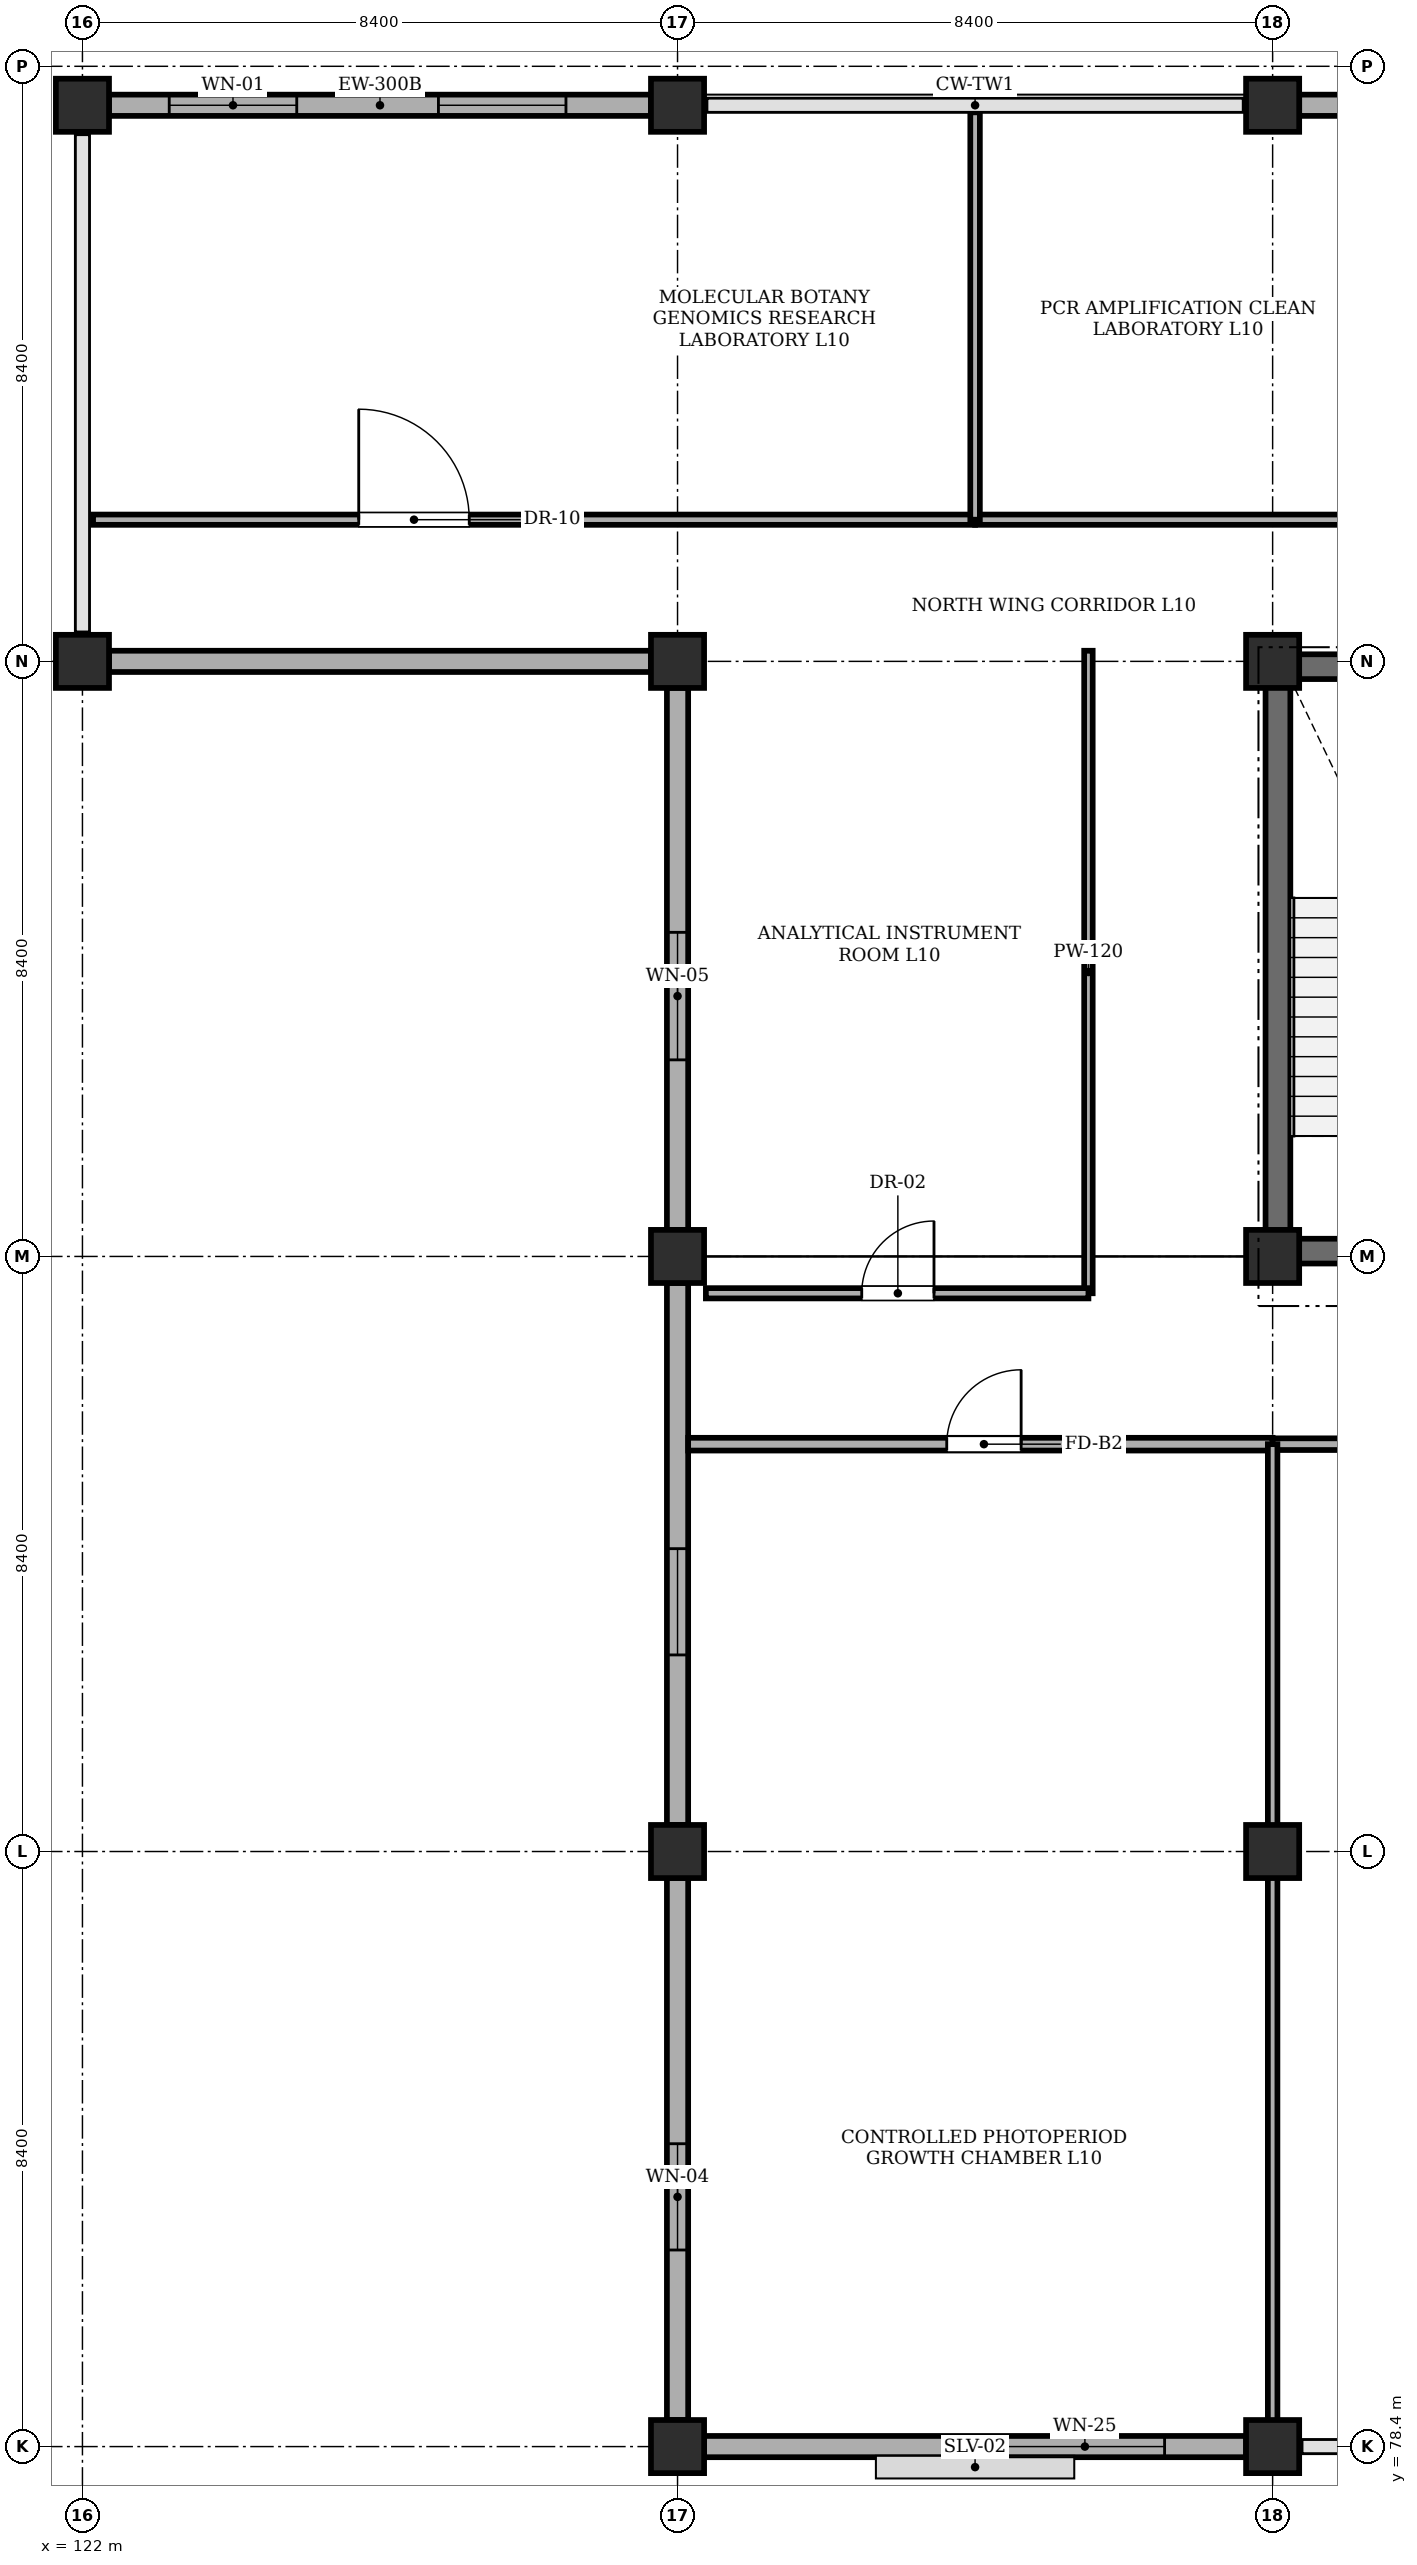
"""IFC4 building model, lengths in metres.
Left out: names, types, materials, properties, quantities, classifications, styles, units other than length and angle.
Written with IfcOpenShell. Run it as: python <this file> out.ifc"""

import sys

from ifc_helpers import new_model, si_unit, direction, frame, frame_2d, origin, origin_2d, place, context, subcontext, project, spatial, rectangle, extrude, element, fill, save


model = new_model("IFC4")
c1 = context("Model", 3, precision=1e-05, world=origin(), true_north=direction((0.0, 1.0)))
c2 = subcontext(c1, "Body", "Model", "MODEL_VIEW")
j1 = project(units=[si_unit("LENGTHUNIT", "METRE"), si_unit("PLANEANGLEUNIT", "RADIAN")], contexts=[c1])
p1 = place(None, origin())
s1 = spatial("IfcSite", under=j1, at=p1, CompositionType="ELEMENT")
p2 = place(p1, origin())
s2 = spatial("IfcBuilding", under=s1, at=p2, CompositionType="ELEMENT")
p3 = place(p2, frame((0.0, 0.0, 40.2)))
s3 = spatial("IfcBuildingStorey", under=s2, at=p3, CompositionType="ELEMENT", Elevation=40.2)
for number, where, z_axis, x_axis in (
    (1, (122.0, 103.6, 0.0), (0.0, 0.0, 1.0), (1.0, 0.0, 0.0)),
    (2, (122.0, 111.45, 0.0), (0.0, 0.0, 1.0), (1.0, 0.0, 0.0)),
    (3, (130.4, 78.4, 0.0), (0.0, 0.0, 1.0), (1.0, 0.0, 0.0)),
    (4, (130.4, 86.8, 0.0), (0.0, 0.0, 1.0), (1.0, 0.0, 0.0)),
    (5, (130.4, 95.2, 0.0), (0.0, 0.0, 1.0), (1.0, 0.0, 0.0)),
    (6, (130.4, 103.6, 0.0), (0.0, 0.0, 1.0), (1.0, 0.0, 0.0)),
    (7, (130.4, 111.45, 0.0), (0.0, 0.0, 1.0), (1.0, 0.0, 0.0)),
    (8, (138.8, 78.4, 0.0), (0.0, 0.0, 1.0), (1.0, 0.0, 0.0)),
    (9, (138.8, 86.8, 0.0), (0.0, 0.0, 1.0), (1.0, 0.0, 0.0)),
    (10, (138.8, 95.2, 0.0), (0.0, 0.0, 1.0), (1.0, 0.0, 0.0)),
    (11, (138.8, 103.6, 0.0), (0.0, 0.0, 1.0), (1.0, 0.0, 0.0)),
    (12, (138.8, 111.45, 0.0), (0.0, 0.0, 1.0), (1.0, 0.0, 0.0)),
):
    element("IfcColumn", number, at=place(p3, frame(where, z_axis=z_axis, x_axis=x_axis)), inside=s3, PredefinedType="COLUMN", context=c2, shape_type="SweptSolid", body=[
        extrude(rectangle(XDim=0.75, YDim=0.75, at=origin_2d()), origin(), (0.0, 0.0, 1.0), 4.0),
    ])
for number, where, z_axis, x_axis in (
    (13, (138.7, 95.275, 0.0), (0.0, 0.0, 1.0), (1.0, 0.0, 0.0)),
    (14, (138.7, 103.525, 0.0), (0.0, 0.0, 1.0), (1.0, 0.0, 0.0)),
):
    element("IfcWall", number, at=place(p3, frame(where, z_axis=z_axis, x_axis=x_axis)), inside=s3, PredefinedType="SHEAR", context=c2, shape_type="SweptSolid", body=[
        extrude(rectangle(XDim=3.8, YDim=0.35, at=frame_2d((1.9, 0.0))), origin(), (0.0, 0.0, 1.0), 4.0),
    ])
p4 = place(p3, frame((138.875, 95.45, 0.0), z_axis=(0.0, 0.0, 1.0), x_axis=(0.0, 1.0, 0.0)))
e15 = element("IfcWall", 15, at=p4, inside=s3, PredefinedType="SHEAR", context=c2, shape_type="SweptSolid", body=[
    extrude(rectangle(XDim=7.9, YDim=0.35, at=frame_2d((3.95, 0.0))), origin(), (0.0, 0.0, 1.0), 4.0),
])
p5 = place(p3, frame((122.375, 111.45, 0.0), z_axis=(0.0, 0.0, 1.0), x_axis=(1.0, 0.0, 0.0)))
e16 = element("IfcWall", 16, at=p5, inside=s3, PredefinedType="STANDARD", context=c2, shape_type="SweptSolid", body=[
    extrude(rectangle(XDim=7.65, YDim=0.3, at=frame_2d((3.825, 0.0))), origin(), (0.0, 0.0, 1.0), 3.3),
])
p6 = place(p5, frame((0.85, 0.0, 0.9)))
e17 = element("IfcOpeningElement", 17, at=p6, cuts=e16, PredefinedType="OPENING", context=c2, shape_type="SweptSolid", body=[
    extrude(rectangle(XDim=1.8, YDim=2.1, at=frame_2d((0.9, 1.05))), frame((0.0, 0.16, 0.0), z_axis=(0.0, -1.0, 0.0), x_axis=(1.0, 0.0, 0.0)), (0.0, 0.0, 1.0), 0.32),
])
p7 = place(p5, frame((4.65, 0.0, 0.9)))
e18 = element("IfcOpeningElement", 18, at=p7, cuts=e16, PredefinedType="OPENING", context=c2, shape_type="SweptSolid", body=[
    extrude(rectangle(XDim=1.8, YDim=2.1, at=frame_2d((0.9, 1.05))), frame((0.0, 0.16, 0.0), z_axis=(0.0, -1.0, 0.0), x_axis=(1.0, 0.0, 0.0)), (0.0, 0.0, 1.0), 0.32),
])
p8 = place(p3, frame((139.175, 111.45, 0.0), z_axis=(0.0, 0.0, 1.0), x_axis=(1.0, 0.0, 0.0)))
e19 = element("IfcWall", 19, at=p8, inside=s3, PredefinedType="STANDARD", context=c2, shape_type="SweptSolid", body=[
    extrude(rectangle(XDim=7.65, YDim=0.3, at=frame_2d((3.825, 0.0))), origin(), (0.0, 0.0, 1.0), 3.3),
])
p9 = place(p8, frame((0.85, 0.0, 0.9)))
e20 = element("IfcOpeningElement", 20, at=p9, cuts=e19, PredefinedType="OPENING", context=c2, shape_type="SweptSolid", body=[
    extrude(rectangle(XDim=1.8, YDim=2.1, at=frame_2d((0.9, 1.05))), frame((0.0, 0.16, 0.0), z_axis=(0.0, -1.0, 0.0), x_axis=(1.0, 0.0, 0.0)), (0.0, 0.0, 1.0), 0.32),
])
p10 = place(p8, frame((4.65, 0.0, 0.9)))
e21 = element("IfcOpeningElement", 21, at=p10, cuts=e19, PredefinedType="OPENING", context=c2, shape_type="SweptSolid", body=[
    extrude(rectangle(XDim=1.8, YDim=2.1, at=frame_2d((0.9, 1.05))), frame((0.0, 0.16, 0.0), z_axis=(0.0, -1.0, 0.0), x_axis=(1.0, 0.0, 0.0)), (0.0, 0.0, 1.0), 0.32),
])
p11 = place(p3, frame((138.425, 78.4, 0.0), z_axis=(0.0, 0.0, 1.0), x_axis=(-1.0, 0.0, 0.0)))
e22 = element("IfcWall", 22, at=p11, inside=s3, PredefinedType="STANDARD", context=c2, shape_type="SweptSolid", body=[
    extrude(rectangle(XDim=7.65, YDim=0.3, at=frame_2d((3.825, 0.0))), origin(), (0.0, 0.0, 1.0), 4.0),
])
p12 = place(p11, frame((1.15, 0.0, 0.95)))
e23 = element("IfcOpeningElement", 23, at=p12, cuts=e22, PredefinedType="OPENING", context=c2, shape_type="SweptSolid", body=[
    extrude(rectangle(XDim=2.25, YDim=1.95, at=frame_2d((1.125, 0.975))), frame((0.0, 0.16, 0.0), z_axis=(0.0, -1.0, 0.0), x_axis=(1.0, 0.0, 0.0)), (0.0, 0.0, 1.0), 0.32),
])
p13 = place(p3, frame((130.4, 78.775, 0.0), z_axis=(0.0, 0.0, 1.0), x_axis=(0.0, 1.0, 0.0)))
e24 = element("IfcWall", 24, at=p13, inside=s3, PredefinedType="STANDARD", context=c2, shape_type="SweptSolid", body=[
    extrude(rectangle(XDim=7.65, YDim=0.3, at=frame_2d((3.825, 0.0))), origin(), (0.0, 0.0, 1.0), 4.0),
])
p14 = place(p13, frame((2.4, 0.0, 0.95)))
e25 = element("IfcOpeningElement", 25, at=p14, cuts=e24, PredefinedType="OPENING", context=c2, shape_type="SweptSolid", body=[
    extrude(rectangle(XDim=1.5, YDim=1.8, at=frame_2d((0.75, 0.9))), frame((0.0, 0.16, 0.0), z_axis=(0.0, -1.0, 0.0), x_axis=(1.0, 0.0, 0.0)), (0.0, 0.0, 1.0), 0.32),
])
p15 = place(p3, frame((130.4, 87.175, 0.0), z_axis=(0.0, 0.0, 1.0), x_axis=(0.0, 1.0, 0.0)))
e26 = element("IfcWall", 26, at=p15, inside=s3, PredefinedType="STANDARD", context=c2, shape_type="SweptSolid", body=[
    extrude(rectangle(XDim=7.65, YDim=0.3, at=frame_2d((3.825, 0.0))), origin(), (0.0, 0.0, 1.0), 3.3),
])
p16 = place(p15, frame((2.4, 0.0, 0.95)))
e27 = element("IfcOpeningElement", 27, at=p16, cuts=e26, PredefinedType="OPENING", context=c2, shape_type="SweptSolid", body=[
    extrude(rectangle(XDim=1.5, YDim=1.8, at=frame_2d((0.75, 0.9))), frame((0.0, 0.16, 0.0), z_axis=(0.0, -1.0, 0.0), x_axis=(1.0, 0.0, 0.0)), (0.0, 0.0, 1.0), 0.32),
])
p17 = place(p3, frame((130.4, 95.575, 0.0), z_axis=(0.0, 0.0, 1.0), x_axis=(0.0, 1.0, 0.0)))
e28 = element("IfcWall", 28, at=p17, inside=s3, PredefinedType="STANDARD", context=c2, shape_type="SweptSolid", body=[
    extrude(rectangle(XDim=7.65, YDim=0.3, at=frame_2d((3.825, 0.0))), origin(), (0.0, 0.0, 1.0), 3.3),
])
p18 = place(p17, frame((2.4, 0.0, 1.0)))
e29 = element("IfcOpeningElement", 29, at=p18, cuts=e28, PredefinedType="OPENING", context=c2, shape_type="SweptSolid", body=[
    extrude(rectangle(XDim=1.8, YDim=1.8, at=frame_2d((0.9, 0.9))), frame((0.0, 0.16, 0.0), z_axis=(0.0, -1.0, 0.0), x_axis=(1.0, 0.0, 0.0)), (0.0, 0.0, 1.0), 0.32),
])
p19 = place(p3, frame((130.025, 103.6, 0.0), z_axis=(0.0, 0.0, 1.0), x_axis=(-1.0, 0.0, 0.0)))
e30 = element("IfcWall", 30, at=p19, inside=s3, PredefinedType="STANDARD", context=c2, shape_type="SweptSolid", body=[
    extrude(rectangle(XDim=7.65, YDim=0.3, at=frame_2d((3.825, 0.0))), origin(), (0.0, 0.0, 1.0), 3.3),
])
p20 = place(p3, frame((136.2, 94.68, 0.0), z_axis=(0.0, 0.0, 1.0), x_axis=(0.0, 1.0, 0.0)))
e31 = element("IfcWall", 31, at=p20, inside=s3, PredefinedType="PARTITIONING", context=c2, shape_type="SweptSolid", body=[
    extrude(rectangle(XDim=9.07, YDim=0.12, at=frame_2d((4.535, 0.0))), origin(), (0.0, 0.0, 1.0), 4.0),
])
p21 = place(p3, frame((130.8, 94.68, 0.0), z_axis=(0.0, 0.0, 1.0), x_axis=(1.0, 0.0, 0.0)))
e32 = element("IfcWall", 32, at=p21, inside=s3, PredefinedType="PARTITIONING", context=c2, shape_type="SweptSolid", body=[
    extrude(rectangle(XDim=5.4, YDim=0.145, at=frame_2d((2.7, 0.0))), origin(), (0.0, 0.0, 1.0), 4.0),
])
p22 = place(p21, frame((2.2, 0.0, 0.0)))
e33 = element("IfcOpeningElement", 33, at=p22, cuts=e32, PredefinedType="OPENING", context=c2, shape_type="SweptSolid", body=[
    extrude(rectangle(XDim=1.02, YDim=2.15, at=frame_2d((0.51, 1.075))), frame((0.0, 0.083, 0.0), z_axis=(0.0, -1.0, 0.0), x_axis=(1.0, 0.0, 0.0)), (0.0, 0.0, 1.0), 0.165),
])
p23 = place(p3, frame((122.15, 105.6, 0.0), z_axis=(0.0, 0.0, 1.0), x_axis=(1.0, 0.0, 0.0)))
e34 = element("IfcWall", 34, at=p23, inside=s3, PredefinedType="PARTITIONING", context=c2, shape_type="SweptSolid", body=[
    extrude(rectangle(XDim=12.45, YDim=0.145, at=frame_2d((6.225, 0.0))), origin(), (0.0, 0.0, 1.0), 4.0),
])
p24 = place(p23, frame((3.75, 0.0, 0.0)))
e35 = element("IfcOpeningElement", 35, at=p24, cuts=e34, PredefinedType="OPENING", context=c2, shape_type="SweptSolid", body=[
    extrude(rectangle(XDim=1.56, YDim=2.22, at=frame_2d((0.78, 1.11))), frame((0.0, 0.083, 0.0), z_axis=(0.0, -1.0, 0.0), x_axis=(1.0, 0.0, 0.0)), (0.0, 0.0, 1.0), 0.165),
])
p25 = place(p3, frame((134.6, 105.6, 0.0), z_axis=(0.0, 0.0, 1.0), x_axis=(1.0, 0.0, 0.0)))
e36 = element("IfcWall", 36, at=p25, inside=s3, PredefinedType="PARTITIONING", context=c2, shape_type="SweptSolid", body=[
    extrude(rectangle(XDim=12.6, YDim=0.145, at=frame_2d((6.3, 0.0))), origin(), (0.0, 0.0, 1.0), 4.0),
])
p26 = place(p25, frame((6.8, 0.0, 0.0)))
e37 = element("IfcOpeningElement", 37, at=p26, cuts=e36, PredefinedType="OPENING", context=c2, shape_type="SweptSolid", body=[
    extrude(rectangle(XDim=1.02, YDim=2.15, at=frame_2d((0.51, 1.075))), frame((0.0, 0.083, 0.0), z_axis=(0.0, -1.0, 0.0), x_axis=(1.0, 0.0, 0.0)), (0.0, 0.0, 1.0), 0.165),
])
p27 = place(p3, frame((134.6, 105.6, 0.0), z_axis=(0.0, 0.0, 1.0), x_axis=(0.0, 1.0, 0.0)))
e38 = element("IfcWall", 38, at=p27, inside=s3, PredefinedType="PARTITIONING", context=c2, shape_type="SweptSolid", body=[
    extrude(rectangle(XDim=5.75, YDim=0.135, at=frame_2d((2.875, 0.0))), origin(), (0.0, 0.0, 1.0), 3.55),
])
p28 = place(p3, frame((130.55, 92.55, 0.0), z_axis=(0.0, 0.0, 1.0), x_axis=(1.0, 0.0, 0.0)))
e39 = element("IfcWall", 39, at=p28, inside=s3, PredefinedType="STANDARD", context=c2, shape_type="SweptSolid", body=[
    extrude(rectangle(XDim=8.25, YDim=0.18, at=frame_2d((4.125, 0.0))), origin(), (0.0, 0.0, 1.0), 4.0),
])
p29 = place(p28, frame((3.65, 0.0, 0.0)))
e40 = element("IfcOpeningElement", 40, at=p29, cuts=e39, PredefinedType="OPENING", context=c2, shape_type="SweptSolid", body=[
    extrude(rectangle(XDim=1.05, YDim=2.15, at=frame_2d((0.525, 1.075))), frame((0.0, 0.1, 0.0), z_axis=(0.0, -1.0, 0.0), x_axis=(1.0, 0.0, 0.0)), (0.0, 0.0, 1.0), 0.2),
])
p30 = place(p3, frame((138.8, 92.55, 0.0), z_axis=(0.0, 0.0, 1.0), x_axis=(1.0, 0.0, 0.0)))
e41 = element("IfcWall", 41, at=p30, inside=s3, PredefinedType="PARTITIONING", context=c2, shape_type="SweptSolid", body=[
    extrude(rectangle(XDim=12.6, YDim=0.165, at=frame_2d((6.3, 0.0))), origin(), (0.0, 0.0, 1.0), 4.0),
])
p31 = place(p30, frame((3.4, 0.0, 0.0)))
e42 = element("IfcOpeningElement", 42, at=p31, cuts=e41, PredefinedType="OPENING", context=c2, shape_type="SweptSolid", body=[
    extrude(rectangle(XDim=1.02, YDim=2.15, at=frame_2d((0.51, 1.075))), frame((0.0, 0.093, 0.0), z_axis=(0.0, -1.0, 0.0), x_axis=(1.0, 0.0, 0.0)), (0.0, 0.0, 1.0), 0.185),
])
p32 = place(p3, frame((138.8, 78.55, 0.0), z_axis=(0.0, 0.0, 1.0), x_axis=(0.0, 1.0, 0.0)))
e43 = element("IfcWall", 43, at=p32, inside=s3, PredefinedType="PARTITIONING", context=c2, shape_type="SweptSolid", body=[
    extrude(rectangle(XDim=14.0, YDim=0.135, at=frame_2d((7.0, 0.0))), origin(), (0.0, 0.0, 1.0), 3.3),
])
p33 = place(p6, origin())
e44 = element("IfcWindow", 44, at=p33, inside=s3, PartitioningType="DOUBLE_PANEL_VERTICAL", PredefinedType="WINDOW", context=c2, shape_type="SweptSolid", body=[
    extrude(rectangle(XDim=1.8, YDim=2.1, at=frame_2d((0.9, 1.05))), frame((0.0, 0.03, 0.0), z_axis=(0.0, -1.0, 0.0), x_axis=(1.0, 0.0, 0.0)), (0.0, 0.0, 1.0), 0.06),
])
fill(e17, e44)
p34 = place(p7, origin())
e45 = element("IfcWindow", 45, at=p34, inside=s3, PartitioningType="DOUBLE_PANEL_VERTICAL", PredefinedType="WINDOW", context=c2, shape_type="SweptSolid", body=[
    extrude(rectangle(XDim=1.8, YDim=2.1, at=frame_2d((0.9, 1.05))), frame((0.0, 0.03, 0.0), z_axis=(0.0, -1.0, 0.0), x_axis=(1.0, 0.0, 0.0)), (0.0, 0.0, 1.0), 0.06),
])
fill(e18, e45)
p35 = place(p12, origin())
e46 = element("IfcWindow", 46, at=p35, inside=s3, PartitioningType="TRIPLE_PANEL_VERTICAL", PredefinedType="WINDOW", context=c2, shape_type="SweptSolid", body=[
    extrude(rectangle(XDim=2.25, YDim=1.95, at=frame_2d((1.125, 0.975))), frame((0.0, 0.03, 0.0), z_axis=(0.0, -1.0, 0.0), x_axis=(1.0, 0.0, 0.0)), (0.0, 0.0, 1.0), 0.06),
])
fill(e23, e46)
p36 = place(p14, origin())
e47 = element("IfcWindow", 47, at=p36, inside=s3, PartitioningType="DOUBLE_PANEL_VERTICAL", PredefinedType="WINDOW", context=c2, shape_type="SweptSolid", body=[
    extrude(rectangle(XDim=1.5, YDim=1.8, at=frame_2d((0.75, 0.9))), frame((0.0, 0.03, 0.0), z_axis=(0.0, -1.0, 0.0), x_axis=(1.0, 0.0, 0.0)), (0.0, 0.0, 1.0), 0.06),
])
fill(e25, e47)
p37 = place(p16, origin())
e48 = element("IfcWindow", 48, at=p37, inside=s3, PartitioningType="DOUBLE_PANEL_VERTICAL", PredefinedType="WINDOW", context=c2, shape_type="SweptSolid", body=[
    extrude(rectangle(XDim=1.5, YDim=1.8, at=frame_2d((0.75, 0.9))), frame((0.0, 0.03, 0.0), z_axis=(0.0, -1.0, 0.0), x_axis=(1.0, 0.0, 0.0)), (0.0, 0.0, 1.0), 0.06),
])
fill(e27, e48)
p38 = place(p18, origin())
e49 = element("IfcWindow", 49, at=p38, inside=s3, PartitioningType="DOUBLE_PANEL_VERTICAL", PredefinedType="WINDOW", context=c2, shape_type="SweptSolid", body=[
    extrude(rectangle(XDim=1.8, YDim=1.8, at=frame_2d((0.9, 0.9))), frame((0.0, 0.03, 0.0), z_axis=(0.0, -1.0, 0.0), x_axis=(1.0, 0.0, 0.0)), (0.0, 0.0, 1.0), 0.06),
])
fill(e29, e49)
p39 = place(p22, origin())
e50 = element("IfcDoor", 50, at=p39, inside=s3, OperationType="SINGLE_SWING_RIGHT", PredefinedType="DOOR", context=c2, shape_type="SweptSolid", body=[
    extrude(rectangle(XDim=1.02, YDim=2.15, at=frame_2d((0.51, 1.075))), frame((0.0, 0.025, 0.0), z_axis=(0.0, -1.0, 0.0), x_axis=(1.0, 0.0, 0.0)), (0.0, 0.0, 1.0), 0.05),
])
fill(e33, e50)
p40 = place(p24, origin())
e51 = element("IfcDoor", 51, at=p40, inside=s3, OperationType="SINGLE_SWING_LEFT", PredefinedType="DOOR", context=c2, shape_type="SweptSolid", body=[
    extrude(rectangle(XDim=1.56, YDim=2.22, at=frame_2d((0.78, 1.11))), frame((0.0, 0.025, 0.0), z_axis=(0.0, -1.0, 0.0), x_axis=(1.0, 0.0, 0.0)), (0.0, 0.0, 1.0), 0.05),
])
fill(e35, e51)
p41 = place(p29, origin())
e52 = element("IfcDoor", 52, at=p41, inside=s3, OperationType="SINGLE_SWING_RIGHT", PredefinedType="DOOR", context=c2, shape_type="SweptSolid", body=[
    extrude(rectangle(XDim=1.05, YDim=2.15, at=frame_2d((0.525, 1.075))), frame((0.0, 0.025, 0.0), z_axis=(0.0, -1.0, 0.0), x_axis=(1.0, 0.0, 0.0)), (0.0, 0.0, 1.0), 0.05),
])
fill(e40, e52)
save(model, sys.argv[1])
